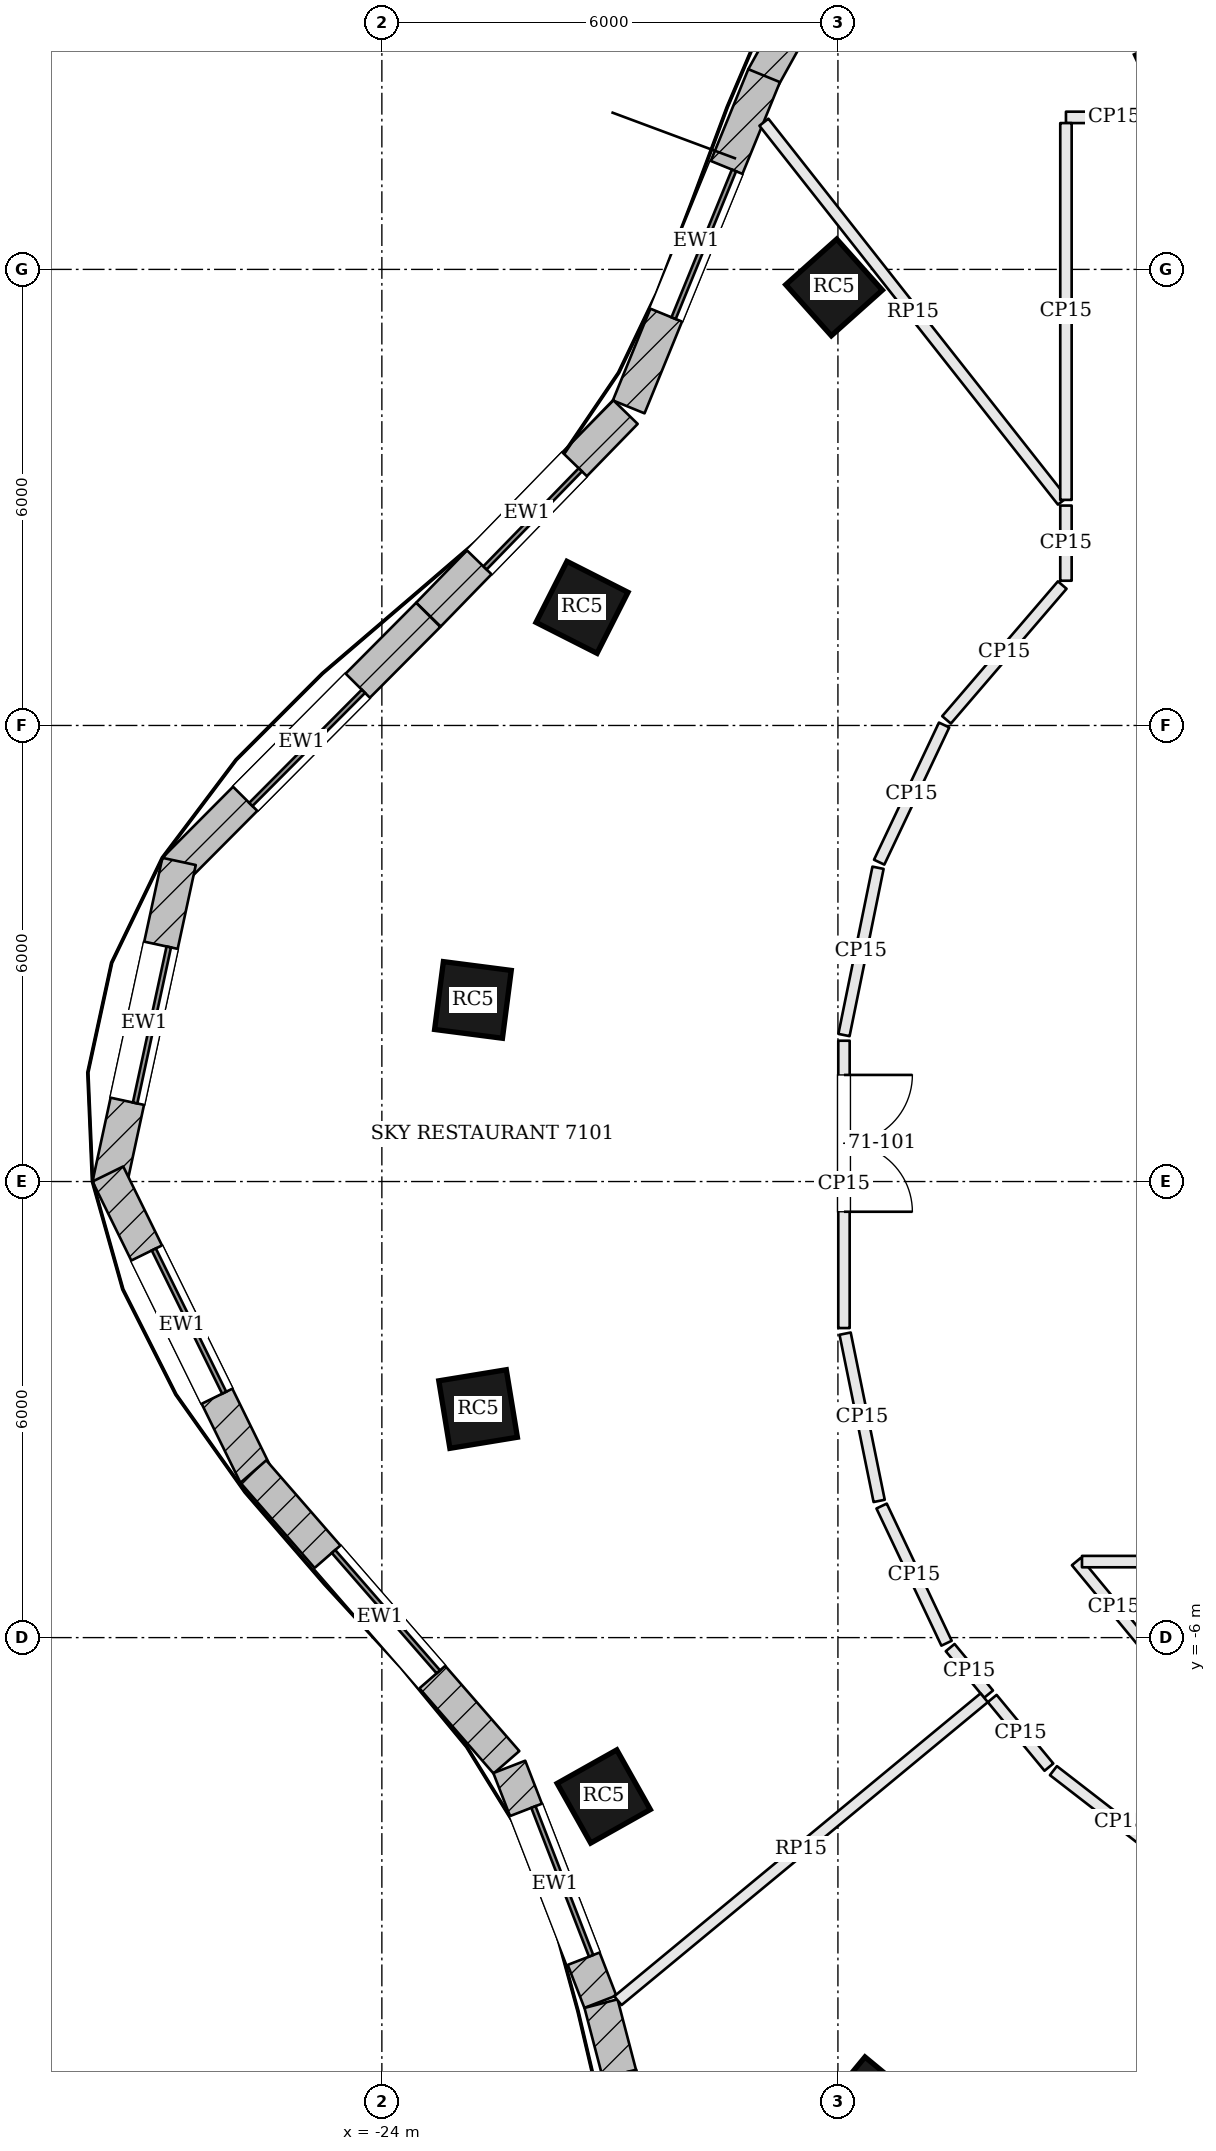
"""IFC4 building model, lengths in metres.
Left out: names, types, materials, properties, quantities, classifications, styles, units other than length and angle.
Written with IfcOpenShell. Run it as: python <this file> out.ifc"""

import sys

from ifc_helpers import new_model, si_unit, direction, frame, frame_2d, origin, origin_2d, place, context, subcontext, project, spatial, rectangle, extrude, element, fill, save


model = new_model("IFC4")
c1 = context("Model", 3, precision=1e-05, world=origin(), true_north=direction((0.0, 1.0)))
c2 = subcontext(c1, "Body", "Model", "MODEL_VIEW")
j1 = project(units=[si_unit("LENGTHUNIT", "METRE"), si_unit("PLANEANGLEUNIT", "RADIAN")], contexts=[c1])
p1 = place(None, origin())
s1 = spatial("IfcSite", under=j1, at=p1, CompositionType="ELEMENT")
p2 = place(p1, origin())
s2 = spatial("IfcBuilding", under=s1, at=p2, CompositionType="ELEMENT")
p3 = place(p2, frame((0.0, 0.0, 288.3)))
s3 = spatial("IfcBuildingStorey", under=s2, at=p3, CompositionType="ELEMENT", Elevation=288.3)
for number, where, z_axis, x_axis in (
    (1, (-13.487, 14.596, 0.0), (0.0, 0.0, 1.0), (-0.91, -0.415, 0.0)),
    (2, (-18.051, 11.763, 0.0), (0.0, 0.0, 1.0), (-0.746, -0.666, 0.0)),
    (3, (-21.367, 7.554, 0.0), (0.0, 0.0, 1.0), (-0.452, -0.892, 0.0)),
    (4, (-22.802, 2.389, 0.0), (0.0, 0.0, 1.0), (-0.129, -0.992, 0.0)),
    (5, (-22.734, -2.993, 0.0), (0.0, 0.0, 1.0), (0.162, -0.987, 0.0)),
    (6, (-21.081, -8.09, 0.0), (0.0, 0.0, 1.0), (0.49, -0.872, 0.0)),
    (7, (-17.584, -12.151, 0.0), (0.0, 0.0, 1.0), (0.771, -0.637, 0.0)),
):
    element("IfcColumn", number, at=place(p3, frame(where, z_axis=z_axis, x_axis=x_axis)), inside=s3, PredefinedType="COLUMN", context=c2, shape_type="SweptSolid", body=[
        extrude(rectangle(XDim=0.9, YDim=0.9, at=origin_2d()), origin(), (0.0, 0.0, 1.0), 3.9),
    ])
p4 = place(p3, frame((-17.359, 17.447, 0.0), z_axis=(0.0, 0.0, 1.0), x_axis=(-0.485618126214, -0.874171056197, 0.0)))
e8 = element("IfcWall", 8, at=p4, inside=s3, PredefinedType="SOLIDWALL", context=c2, shape_type="SweptSolid", body=[
    extrude(rectangle(XDim=3.343, YDim=0.45, at=frame_2d((1.671, 0.0))), origin(), (0.0, 0.0, 1.0), 3.7),
])
p5 = place(p4, frame((0.621, 0.0, 0.9)))
e9 = element("IfcOpeningElement", 9, at=p5, cuts=e8, PredefinedType="OPENING", context=c2, shape_type="SweptSolid", body=[
    extrude(rectangle(XDim=2.1, YDim=2.3, at=frame_2d((1.05, 1.15))), frame((0.0, 0.235, 0.0), z_axis=(0.0, -1.0, 0.0), x_axis=(1.0, 0.0, 0.0)), (0.0, 0.0, 1.0), 0.47),
])
p6 = place(p3, frame((-18.971, 14.549, 0.0), z_axis=(0.0, 0.0, 1.0), x_axis=(-0.378434936431, -0.925627894398, 0.0)))
e10 = element("IfcWall", 10, at=p6, inside=s3, PredefinedType="SOLIDWALL", context=c2, shape_type="SweptSolid", body=[
    extrude(rectangle(XDim=4.708, YDim=0.45, at=frame_2d((2.354, 0.0))), origin(), (0.0, 0.0, 1.0), 3.7),
])
p7 = place(p6, frame((1.304, 0.0, 0.9)))
e11 = element("IfcOpeningElement", 11, at=p7, cuts=e10, PredefinedType="OPENING", context=c2, shape_type="SweptSolid", body=[
    extrude(rectangle(XDim=2.1, YDim=2.3, at=frame_2d((1.05, 1.15))), frame((0.0, 0.235, 0.0), z_axis=(0.0, -1.0, 0.0), x_axis=(1.0, 0.0, 0.0)), (0.0, 0.0, 1.0), 0.47),
])
p8 = place(p3, frame((-20.796, 10.124, 0.0), z_axis=(0.0, 0.0, 1.0), x_axis=(-0.697121527554, -0.716952980203, 0.0)))
e12 = element("IfcWall", 12, at=p8, inside=s3, PredefinedType="SOLIDWALL", context=c2, shape_type="SweptSolid", body=[
    extrude(rectangle(XDim=3.718, YDim=0.45, at=frame_2d((1.859, 0.0))), origin(), (0.0, 0.0, 1.0), 3.7),
])
p9 = place(p8, frame((0.959, 0.0, 0.9)))
e13 = element("IfcOpeningElement", 13, at=p9, cuts=e12, PredefinedType="OPENING", context=c2, shape_type="SweptSolid", body=[
    extrude(rectangle(XDim=1.8, YDim=2.3, at=frame_2d((0.9, 1.15))), frame((0.0, 0.235, 0.0), z_axis=(0.0, -1.0, 0.0), x_axis=(1.0, 0.0, 0.0)), (0.0, 0.0, 1.0), 0.47),
])
p10 = place(p3, frame((-23.39, 7.456, 0.0), z_axis=(0.0, 0.0, 1.0), x_axis=(-0.705349231702, -0.708859973011, 0.0)))
e14 = element("IfcWall", 14, at=p10, inside=s3, PredefinedType="SOLIDWALL", context=c2, shape_type="SweptSolid", body=[
    extrude(rectangle(XDim=4.729, YDim=0.45, at=frame_2d((2.364, 0.0))), origin(), (0.0, 0.0, 1.0), 3.7),
])
p11 = place(p10, frame((1.314, 0.0, 0.9)))
e15 = element("IfcOpeningElement", 15, at=p11, cuts=e14, PredefinedType="OPENING", context=c2, shape_type="SweptSolid", body=[
    extrude(rectangle(XDim=2.1, YDim=2.3, at=frame_2d((1.05, 1.15))), frame((0.0, 0.235, 0.0), z_axis=(0.0, -1.0, 0.0), x_axis=(1.0, 0.0, 0.0)), (0.0, 0.0, 1.0), 0.47),
])
p12 = place(p3, frame((-26.668, 4.211, 0.0), z_axis=(0.0, 0.0, 1.0), x_axis=(-0.210910311825, -0.977505417052, 0.0)))
e16 = element("IfcWall", 16, at=p12, inside=s3, PredefinedType="SOLIDWALL", context=c2, shape_type="SweptSolid", body=[
    extrude(rectangle(XDim=4.357, YDim=0.45, at=frame_2d((2.178, 0.0))), origin(), (0.0, 0.0, 1.0), 3.7),
])
p13 = place(p12, frame((1.128, 0.0, 0.9)))
e17 = element("IfcOpeningElement", 17, at=p13, cuts=e16, PredefinedType="OPENING", context=c2, shape_type="SweptSolid", body=[
    extrude(rectangle(XDim=2.1, YDim=2.3, at=frame_2d((1.05, 1.15))), frame((0.0, 0.235, 0.0), z_axis=(0.0, -1.0, 0.0), x_axis=(1.0, 0.0, 0.0)), (0.0, 0.0, 1.0), 0.47),
])
p14 = place(p3, frame((-27.605, 0.099, 0.0), z_axis=(0.0, 0.0, 1.0), x_axis=(0.440876526139, -0.897567762734, 0.0)))
e18 = element("IfcWall", 18, at=p14, inside=s3, PredefinedType="SOLIDWALL", context=c2, shape_type="SweptSolid", body=[
    extrude(rectangle(XDim=4.415, YDim=0.45, at=frame_2d((2.208, 0.0))), origin(), (0.0, 0.0, 1.0), 3.7),
])
p15 = place(p14, frame((1.158, 0.0, 0.9)))
e19 = element("IfcOpeningElement", 19, at=p15, cuts=e18, PredefinedType="OPENING", context=c2, shape_type="SweptSolid", body=[
    extrude(rectangle(XDim=2.1, YDim=2.3, at=frame_2d((1.05, 1.15))), frame((0.0, 0.235, 0.0), z_axis=(0.0, -1.0, 0.0), x_axis=(1.0, 0.0, 0.0)), (0.0, 0.0, 1.0), 0.47),
])
p16 = place(p3, frame((-25.691, -3.815, 0.0), z_axis=(0.0, 0.0, 1.0), x_axis=(0.656552883353, -0.754279995334, 0.0)))
e20 = element("IfcWall", 20, at=p16, inside=s3, PredefinedType="SOLIDWALL", context=c2, shape_type="SweptSolid", body=[
    extrude(rectangle(XDim=5.071, YDim=0.45, at=frame_2d((2.536, 0.0))), origin(), (0.0, 0.0, 1.0), 3.7),
])
p17 = place(p16, frame((1.486, 0.0, 0.9)))
e21 = element("IfcOpeningElement", 21, at=p17, cuts=e20, PredefinedType="OPENING", context=c2, shape_type="SweptSolid", body=[
    extrude(rectangle(XDim=2.1, YDim=2.3, at=frame_2d((1.05, 1.15))), frame((0.0, 0.235, 0.0), z_axis=(0.0, -1.0, 0.0), x_axis=(1.0, 0.0, 0.0)), (0.0, 0.0, 1.0), 0.47),
])
p18 = place(p3, frame((-22.323, -7.701, 0.0), z_axis=(0.0, 0.0, 1.0), x_axis=(0.361550075906, -0.932352692178, 0.0)))
e22 = element("IfcWall", 22, at=p18, inside=s3, PredefinedType="SOLIDWALL", context=c2, shape_type="SweptSolid", body=[
    extrude(rectangle(XDim=3.313, YDim=0.45, at=frame_2d((1.657, 0.0))), origin(), (0.0, 0.0, 1.0), 3.7),
])
p19 = place(p18, frame((0.607, 0.0, 0.9)))
e23 = element("IfcOpeningElement", 23, at=p19, cuts=e22, PredefinedType="OPENING", context=c2, shape_type="SweptSolid", body=[
    extrude(rectangle(XDim=2.1, YDim=2.3, at=frame_2d((1.05, 1.15))), frame((0.0, 0.235, 0.0), z_axis=(0.0, -1.0, 0.0), x_axis=(1.0, 0.0, 0.0)), (0.0, 0.0, 1.0), 0.47),
])
p20 = place(p3, frame((-21.117, -10.815, 0.0), z_axis=(0.0, 0.0, 1.0), x_axis=(0.253065392985, -0.967449175344, 0.0)))
e24 = element("IfcWall", 24, at=p20, inside=s3, PredefinedType="SOLIDWALL", context=c2, shape_type="SweptSolid", body=[
    extrude(rectangle(XDim=4.015, YDim=0.45, at=frame_2d((2.008, 0.0))), origin(), (0.0, 0.0, 1.0), 3.7),
])
p21 = place(p20, frame((0.958, 0.0, 0.9)))
e25 = element("IfcOpeningElement", 25, at=p21, cuts=e24, PredefinedType="OPENING", context=c2, shape_type="SweptSolid", body=[
    extrude(rectangle(XDim=2.1, YDim=2.3, at=frame_2d((1.05, 1.15))), frame((0.0, 0.235, 0.0), z_axis=(0.0, -1.0, 0.0), x_axis=(1.0, 0.0, 0.0)), (0.0, 0.0, 1.0), 0.47),
])
p22 = place(p3, frame((-15.0, 8.893, 0.0), z_axis=(0.0, 0.0, 1.0), x_axis=(0.0, -1.0, 0.0)))
e26 = element("IfcWall", 26, at=p22, inside=s3, PredefinedType="PARTITIONING", context=c2, shape_type="SweptSolid", body=[
    extrude(rectangle(XDim=0.989, YDim=0.15, at=frame_2d((0.494, 0.0))), origin(), (0.0, 0.0, 1.0), 3.198),
])
p23 = place(p3, frame((-15.049, 7.847, 0.0), z_axis=(0.0, 0.0, 1.0), x_axis=(-0.651264357687, -0.758850931611, 0.0)))
e27 = element("IfcWall", 27, at=p23, inside=s3, PredefinedType="PARTITIONING", context=c2, shape_type="SweptSolid", body=[
    extrude(rectangle(XDim=2.337, YDim=0.15, at=frame_2d((1.169, 0.0))), origin(), (0.0, 0.0, 1.0), 3.198),
])
p24 = place(p3, frame((-16.603, 6.006, 0.0), z_axis=(0.0, 0.0, 1.0), x_axis=(-0.427839289523, -0.903854823708, 0.0)))
e28 = element("IfcWall", 28, at=p24, inside=s3, PredefinedType="PARTITIONING", context=c2, shape_type="SweptSolid", body=[
    extrude(rectangle(XDim=1.997, YDim=0.15, at=frame_2d((0.998, 0.0))), origin(), (0.0, 0.0, 1.0), 3.198),
])
p25 = place(p3, frame((-17.472, 4.128, 0.0), z_axis=(0.0, 0.0, 1.0), x_axis=(-0.199502025364, -0.979897413955, 0.0)))
e29 = element("IfcWall", 29, at=p25, inside=s3, PredefinedType="PARTITIONING", context=c2, shape_type="SweptSolid", body=[
    extrude(rectangle(XDim=2.246, YDim=0.15, at=frame_2d((1.123, 0.0))), origin(), (0.0, 0.0, 1.0), 3.198),
])
p26 = place(p3, frame((-17.92, 1.853, 0.0), z_axis=(0.0, 0.0, 1.0), x_axis=(0.0, -1.0, 0.0)))
e30 = element("IfcWall", 30, at=p26, inside=s3, PredefinedType="PARTITIONING", context=c2, shape_type="SweptSolid", body=[
    extrude(rectangle(XDim=3.78, YDim=0.15, at=frame_2d((1.89, 0.0))), origin(), (0.0, 0.0, 1.0), 3.198),
])
p27 = place(p26, frame((0.45, 0.0, 0.0)))
e31 = element("IfcOpeningElement", 31, at=p27, cuts=e30, PredefinedType="OPENING", context=c2, shape_type="SweptSolid", body=[
    extrude(rectangle(XDim=1.8, YDim=2.1, at=frame_2d((0.9, 1.05))), frame((0.0, 0.085, 0.0), z_axis=(0.0, -1.0, 0.0), x_axis=(1.0, 0.0, 0.0)), (0.0, 0.0, 1.0), 0.17),
])
p28 = place(p3, frame((-17.906, -2.001, 0.0), z_axis=(0.0, 0.0, 1.0), x_axis=(0.199502025364, -0.979897413955, 0.0)))
e32 = element("IfcWall", 32, at=p28, inside=s3, PredefinedType="PARTITIONING", context=c2, shape_type="SweptSolid", body=[
    extrude(rectangle(XDim=2.246, YDim=0.15, at=frame_2d((1.123, 0.0))), origin(), (0.0, 0.0, 1.0), 3.198),
])
p29 = place(p3, frame((-17.425, -4.269, 0.0), z_axis=(0.0, 0.0, 1.0), x_axis=(0.427886578366, -0.90383243804, 0.0)))
e33 = element("IfcWall", 33, at=p29, inside=s3, PredefinedType="PARTITIONING", context=c2, shape_type="SweptSolid", body=[
    extrude(rectangle(XDim=1.996, YDim=0.15, at=frame_2d((0.998, 0.0))), origin(), (0.0, 0.0, 1.0), 3.198),
])
p30 = place(p3, frame((-16.523, -6.132, 0.0), z_axis=(0.0, 0.0, 1.0), x_axis=(0.636698606768, -0.771112757085, 0.0)))
e34 = element("IfcWall", 34, at=p30, inside=s3, PredefinedType="PARTITIONING", context=c2, shape_type="SweptSolid", body=[
    extrude(rectangle(XDim=0.794, YDim=0.15, at=frame_2d((0.397, 0.0))), origin(), (0.0, 0.0, 1.0), 3.198),
])
p31 = place(p3, frame((-18.974, 13.937, 0.0), z_axis=(0.0, 0.0, 1.0), x_axis=(0.618916821117, -0.785456535104, 0.0)))
e35 = element("IfcWall", 35, at=p31, inside=s3, PredefinedType="PARTITIONING", context=c2, shape_type="SweptSolid", body=[
    extrude(rectangle(XDim=6.346, YDim=0.15, at=frame_2d((3.173, 0.0))), origin(), (0.0, 0.0, 1.0), 3.234),
])
p32 = place(p3, frame((-20.894, -10.777, 0.0), z_axis=(0.0, 0.0, 1.0), x_axis=(0.770606553, 0.637311180251, 0.0)))
e36 = element("IfcWall", 36, at=p32, inside=s3, PredefinedType="PARTITIONING", context=c2, shape_type="SweptSolid", body=[
    extrude(rectangle(XDim=6.253, YDim=0.15, at=frame_2d((3.126, 0.0))), origin(), (0.0, 0.0, 1.0), 3.234),
])
p33 = place(p3, frame((-15.97, -6.802, 0.0), z_axis=(0.0, 0.0, 1.0), x_axis=(0.636897609689, -0.770948399552, 0.0)))
e37 = element("IfcWall", 37, at=p33, inside=s3, PredefinedType="PARTITIONING", context=c2, shape_type="SweptSolid", body=[
    extrude(rectangle(XDim=1.171, YDim=0.15, at=frame_2d((0.585, 0.0))), origin(), (0.0, 0.0, 1.0), 3.198),
])
p34 = place(p3, frame((-15.165, -7.75, 0.0), z_axis=(0.0, 0.0, 1.0), x_axis=(0.790917548929, -0.611922732701, 0.0)))
e38 = element("IfcWall", 38, at=p34, inside=s3, PredefinedType="PARTITIONING", context=c2, shape_type="SweptSolid", body=[
    extrude(rectangle(XDim=2.222, YDim=0.15, at=frame_2d((1.111, 0.0))), origin(), (0.0, 0.0, 1.0), 3.198),
])
p35 = place(p3, frame((-13.732, 14.0, 0.0), z_axis=(0.0, 0.0, 1.0), x_axis=(-1.0, 0.0, 0.0)))
e39 = element("IfcWall", 39, at=p35, inside=s3, PredefinedType="PARTITIONING", context=c2, shape_type="SweptSolid", body=[
    extrude(rectangle(XDim=1.268, YDim=0.15, at=frame_2d((0.634, 0.0))), origin(), (0.0, 0.0, 1.0), 3.198),
])
p36 = place(p3, frame((-15.0, 13.925, 0.0), z_axis=(0.0, 0.0, 1.0), x_axis=(0.0, -1.0, 0.0)))
e40 = element("IfcWall", 40, at=p36, inside=s3, PredefinedType="PARTITIONING", context=c2, shape_type="SweptSolid", body=[
    extrude(rectangle(XDim=4.957, YDim=0.15, at=frame_2d((2.479, 0.0))), origin(), (0.0, 0.0, 1.0), 3.198),
])
p37 = place(p3, frame((-13.872, -6.201, 0.0), z_axis=(0.0, 0.0, 1.0), x_axis=(-0.636832838855, 0.771001903601, 0.0)))
e41 = element("IfcWall", 41, at=p37, inside=s3, PredefinedType="PARTITIONING", context=c2, shape_type="SweptSolid", body=[
    extrude(rectangle(XDim=1.558, YDim=0.15, at=frame_2d((0.779, 0.0))), origin(), (0.0, 0.0, 1.0), 3.198),
])
p38 = place(p3, frame((-14.789, -5.0, 0.0), z_axis=(0.0, 0.0, 1.0), x_axis=(1.0, 0.0, 0.0)))
e42 = element("IfcWall", 42, at=p38, inside=s3, PredefinedType="PARTITIONING", context=c2, shape_type="SweptSolid", body=[
    extrude(rectangle(XDim=29.562, YDim=0.15, at=frame_2d((14.781, 0.0))), origin(), (0.0, 0.0, 1.0), 3.198),
])
p39 = place(p38, frame((3.857, 0.0, 0.0)))
e43 = element("IfcOpeningElement", 43, at=p39, cuts=e42, PredefinedType="OPENING", context=c2, shape_type="SweptSolid", body=[
    extrude(rectangle(XDim=1.0, YDim=2.4, at=frame_2d((0.5, 1.2))), frame((0.0, 0.085, 0.0), z_axis=(0.0, -1.0, 0.0), x_axis=(1.0, 0.0, 0.0)), (0.0, 0.0, 1.0), 0.17),
])
p40 = place(p38, frame((14.289, 0.0, 0.0)))
e44 = element("IfcOpeningElement", 44, at=p40, cuts=e42, PredefinedType="OPENING", context=c2, shape_type="SweptSolid", body=[
    extrude(rectangle(XDim=1.0, YDim=2.1, at=frame_2d((0.5, 1.05))), frame((0.0, 0.085, 0.0), z_axis=(0.0, -1.0, 0.0), x_axis=(1.0, 0.0, 0.0)), (0.0, 0.0, 1.0), 0.17),
])
p41 = place(p38, frame((24.713, 0.0, 0.0)))
e45 = element("IfcOpeningElement", 45, at=p41, cuts=e42, PredefinedType="OPENING", context=c2, shape_type="SweptSolid", body=[
    extrude(rectangle(XDim=1.0, YDim=2.4, at=frame_2d((0.5, 1.2))), frame((0.0, 0.085, 0.0), z_axis=(0.0, -1.0, 0.0), x_axis=(1.0, 0.0, 0.0)), (0.0, 0.0, 1.0), 0.17),
])
p42 = place(p7, origin())
e46 = element("IfcWindow", 46, at=p42, inside=s3, PartitioningType="SINGLE_PANEL", PredefinedType="WINDOW", context=c2, shape_type="SweptSolid", body=[
    extrude(rectangle(XDim=2.1, YDim=2.3, at=frame_2d((1.05, 1.15))), frame((0.0, 0.135, 0.0), z_axis=(0.0, -1.0, 0.0), x_axis=(1.0, 0.0, 0.0)), (0.0, 0.0, 1.0), 0.06),
])
fill(e11, e46)
p43 = place(p9, origin())
e47 = element("IfcWindow", 47, at=p43, inside=s3, PartitioningType="SINGLE_PANEL", PredefinedType="WINDOW", context=c2, shape_type="SweptSolid", body=[
    extrude(rectangle(XDim=1.8, YDim=2.3, at=frame_2d((0.9, 1.15))), frame((0.0, 0.135, 0.0), z_axis=(0.0, -1.0, 0.0), x_axis=(1.0, 0.0, 0.0)), (0.0, 0.0, 1.0), 0.06),
])
fill(e13, e47)
p44 = place(p11, origin())
e48 = element("IfcWindow", 48, at=p44, inside=s3, PartitioningType="SINGLE_PANEL", PredefinedType="WINDOW", context=c2, shape_type="SweptSolid", body=[
    extrude(rectangle(XDim=2.1, YDim=2.3, at=frame_2d((1.05, 1.15))), frame((0.0, 0.135, 0.0), z_axis=(0.0, -1.0, 0.0), x_axis=(1.0, 0.0, 0.0)), (0.0, 0.0, 1.0), 0.06),
])
fill(e15, e48)
p45 = place(p13, origin())
e49 = element("IfcWindow", 49, at=p45, inside=s3, PartitioningType="SINGLE_PANEL", PredefinedType="WINDOW", context=c2, shape_type="SweptSolid", body=[
    extrude(rectangle(XDim=2.1, YDim=2.3, at=frame_2d((1.05, 1.15))), frame((0.0, 0.135, 0.0), z_axis=(0.0, -1.0, 0.0), x_axis=(1.0, 0.0, 0.0)), (0.0, 0.0, 1.0), 0.06),
])
fill(e17, e49)
p46 = place(p15, origin())
e50 = element("IfcWindow", 50, at=p46, inside=s3, PartitioningType="SINGLE_PANEL", PredefinedType="WINDOW", context=c2, shape_type="SweptSolid", body=[
    extrude(rectangle(XDim=2.1, YDim=2.3, at=frame_2d((1.05, 1.15))), frame((0.0, 0.135, 0.0), z_axis=(0.0, -1.0, 0.0), x_axis=(1.0, 0.0, 0.0)), (0.0, 0.0, 1.0), 0.06),
])
fill(e19, e50)
p47 = place(p17, origin())
e51 = element("IfcWindow", 51, at=p47, inside=s3, PartitioningType="SINGLE_PANEL", PredefinedType="WINDOW", context=c2, shape_type="SweptSolid", body=[
    extrude(rectangle(XDim=2.1, YDim=2.3, at=frame_2d((1.05, 1.15))), frame((0.0, 0.135, 0.0), z_axis=(0.0, -1.0, 0.0), x_axis=(1.0, 0.0, 0.0)), (0.0, 0.0, 1.0), 0.06),
])
fill(e21, e51)
p48 = place(p19, origin())
e52 = element("IfcWindow", 52, at=p48, inside=s3, PartitioningType="SINGLE_PANEL", PredefinedType="WINDOW", context=c2, shape_type="SweptSolid", body=[
    extrude(rectangle(XDim=2.1, YDim=2.3, at=frame_2d((1.05, 1.15))), frame((0.0, 0.135, 0.0), z_axis=(0.0, -1.0, 0.0), x_axis=(1.0, 0.0, 0.0)), (0.0, 0.0, 1.0), 0.06),
])
fill(e23, e52)
p49 = place(p27, origin())
e53 = element("IfcDoor", 53, at=p49, inside=s3, OperationType="DOUBLE_DOOR_SINGLE_SWING", PredefinedType="DOOR", context=c2, shape_type="SweptSolid", body=[
    extrude(rectangle(XDim=1.8, YDim=2.1, at=frame_2d((0.9, 1.05))), frame((0.0, 0.025, 0.0), z_axis=(0.0, -1.0, 0.0), x_axis=(1.0, 0.0, 0.0)), (0.0, 0.0, 1.0), 0.05),
])
fill(e31, e53)
save(model, sys.argv[1])
